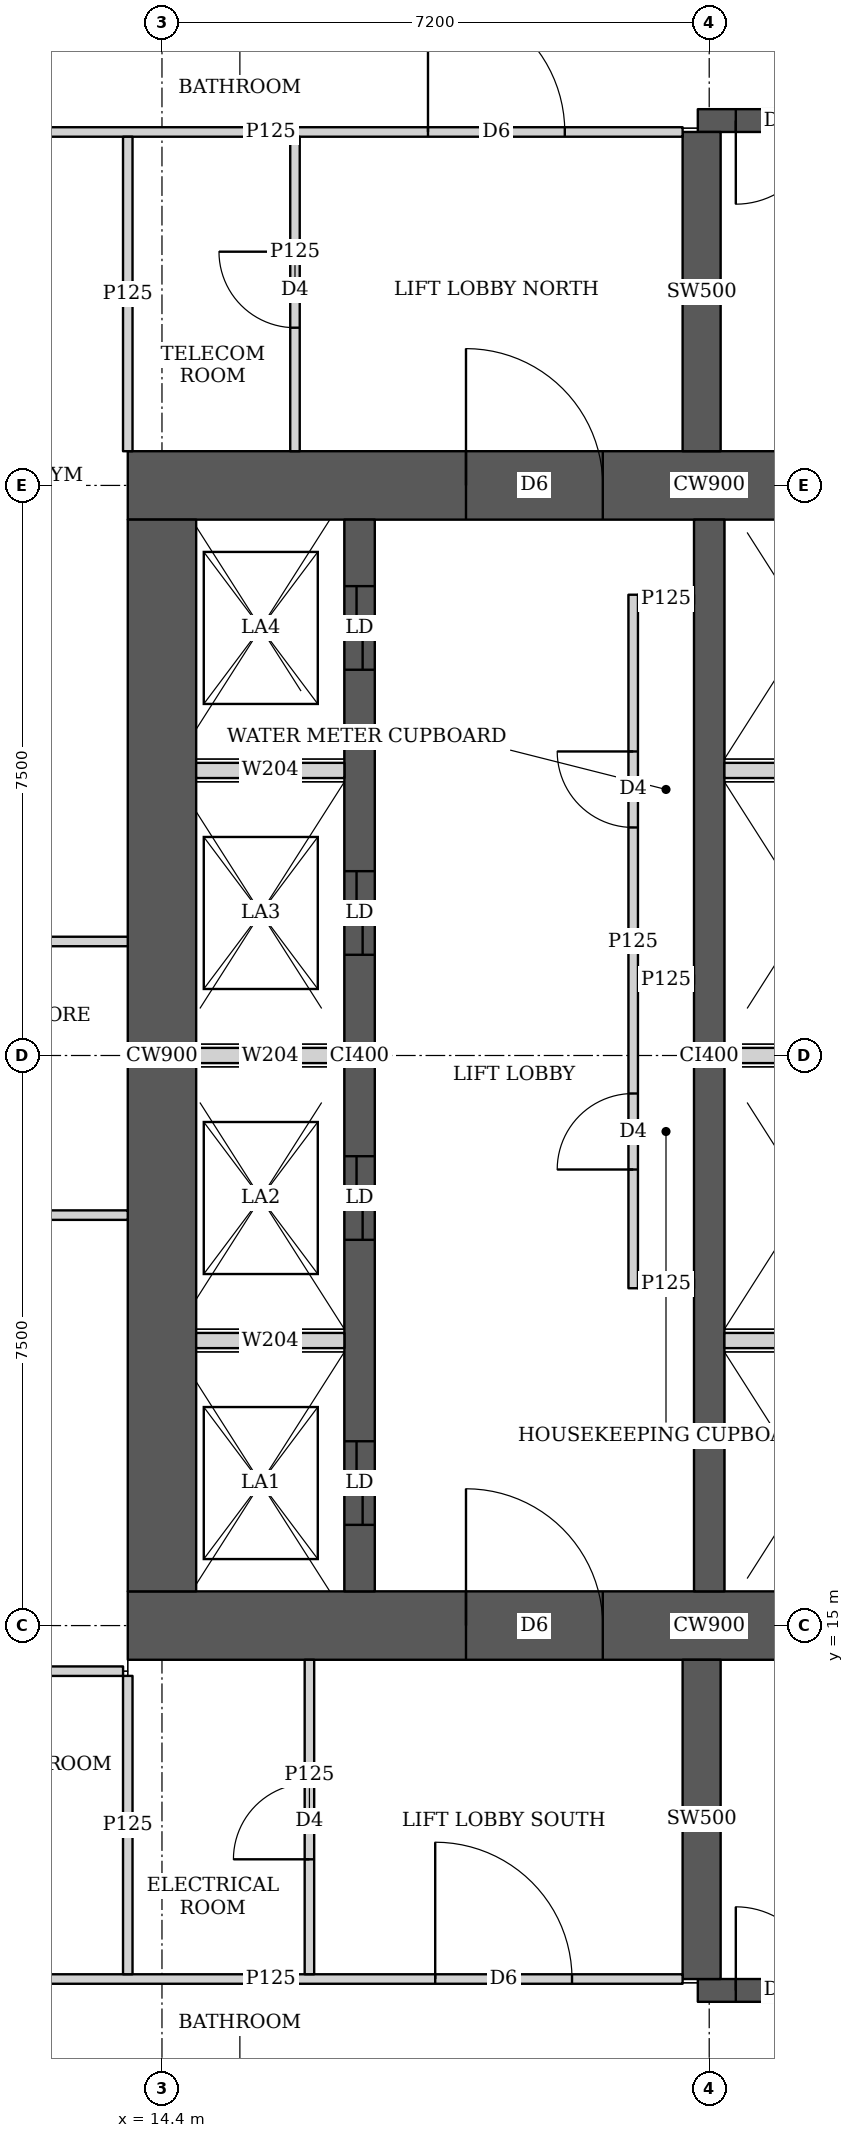
"""IFC4 building model, lengths in metres.
Left out: names, types, materials, properties, quantities, classifications, styles, units other than length and angle.
Written with IfcOpenShell. Run it as: python <this file> out.ifc"""

import sys

from ifc_helpers import new_model, si_unit, direction, frame, frame_2d, origin, place, context, subcontext, project, spatial, rectangle, extrude, element, fill, save


model = new_model("IFC4")
c1 = context("Model", 3, precision=1e-05, world=origin(), true_north=direction((0.0, 1.0)))
c2 = subcontext(c1, "Body", "Model", "MODEL_VIEW")
j1 = project(units=[si_unit("LENGTHUNIT", "METRE"), si_unit("PLANEANGLEUNIT", "RADIAN")], contexts=[c1])
p1 = place(None, origin())
s1 = spatial("IfcSite", under=j1, at=p1, CompositionType="ELEMENT")
p2 = place(p1, origin())
s2 = spatial("IfcBuilding", under=s1, at=p2, CompositionType="ELEMENT")
p3 = place(p2, frame((0.0, 0.0, 89.15)))
s3 = spatial("IfcBuildingStorey", under=s2, at=p3, CompositionType="ELEMENT", Elevation=89.15)
p4 = place(p3, frame((13.95, 15.0, 0.0), z_axis=(0.0, 0.0, 1.0), x_axis=(1.0, 0.0, 0.0)))
e1 = element("IfcWall", 1, at=p4, inside=s3, PredefinedType="SHEAR", context=c2, shape_type="SweptSolid", body=[
    extrude(rectangle(XDim=15.3, YDim=0.9, at=frame_2d((7.65, 0.0))), origin(), (0.0, 0.0, 1.0), 3.75),
])
p5 = place(p4, frame((4.45, 0.0, 0.0)))
e2 = element("IfcOpeningElement", 2, at=p5, cuts=e1, PredefinedType="OPENING", context=c2, shape_type="SweptSolid", body=[
    extrude(rectangle(XDim=1.8, YDim=2.1, at=frame_2d((0.9, 1.05))), frame((0.0, 0.46, 0.0), z_axis=(0.0, -1.0, 0.0), x_axis=(1.0, 0.0, 0.0)), (0.0, 0.0, 1.0), 0.92),
])
p6 = place(p4, frame((10.7, 0.0, 0.0)))
e3 = element("IfcOpeningElement", 3, at=p6, cuts=e1, PredefinedType="OPENING", context=c2, shape_type="SweptSolid", body=[
    extrude(rectangle(XDim=1.1, YDim=2.1, at=frame_2d((0.55, 1.05))), frame((0.0, 0.46, 0.0), z_axis=(0.0, -1.0, 0.0), x_axis=(1.0, 0.0, 0.0)), (0.0, 0.0, 1.0), 0.92),
])
p7 = place(p3, frame((13.95, 30.0, 0.0), z_axis=(0.0, 0.0, 1.0), x_axis=(1.0, 0.0, 0.0)))
e4 = element("IfcWall", 4, at=p7, inside=s3, PredefinedType="SHEAR", context=c2, shape_type="SweptSolid", body=[
    extrude(rectangle(XDim=15.3, YDim=0.9, at=frame_2d((7.65, 0.0))), origin(), (0.0, 0.0, 1.0), 3.75),
])
p8 = place(p7, frame((4.45, 0.0, 0.0)))
e5 = element("IfcOpeningElement", 5, at=p8, cuts=e4, PredefinedType="OPENING", context=c2, shape_type="SweptSolid", body=[
    extrude(rectangle(XDim=1.8, YDim=2.1, at=frame_2d((0.9, 1.05))), frame((0.0, 0.46, 0.0), z_axis=(0.0, -1.0, 0.0), x_axis=(1.0, 0.0, 0.0)), (0.0, 0.0, 1.0), 0.92),
])
p9 = place(p7, frame((10.7, 0.0, 0.0)))
e6 = element("IfcOpeningElement", 6, at=p9, cuts=e4, PredefinedType="OPENING", context=c2, shape_type="SweptSolid", body=[
    extrude(rectangle(XDim=1.1, YDim=2.1, at=frame_2d((0.55, 1.05))), frame((0.0, 0.46, 0.0), z_axis=(0.0, -1.0, 0.0), x_axis=(1.0, 0.0, 0.0)), (0.0, 0.0, 1.0), 0.92),
])
p10 = place(p3, frame((14.4, 15.45, 0.0), z_axis=(0.0, 0.0, 1.0), x_axis=(0.0, 1.0, 0.0)))
e7 = element("IfcWall", 7, at=p10, inside=s3, PredefinedType="SHEAR", context=c2, shape_type="SweptSolid", body=[
    extrude(rectangle(XDim=14.1, YDim=0.9, at=frame_2d((7.05, 0.0))), origin(), (0.0, 0.0, 1.0), 3.75),
])
p11 = place(p3, frame((17.0, 15.45, 0.0), z_axis=(0.0, 0.0, 1.0), x_axis=(0.0, 1.0, 0.0)))
e8 = element("IfcWall", 8, at=p11, inside=s3, PredefinedType="SHEAR", context=c2, shape_type="SweptSolid", body=[
    extrude(rectangle(XDim=14.1, YDim=0.4, at=frame_2d((7.05, 0.0))), origin(), (0.0, 0.0, 1.0), 3.75),
])
p12 = place(p11, frame((0.875, 0.0, 0.0)))
e9 = element("IfcOpeningElement", 9, at=p12, cuts=e8, PredefinedType="OPENING", context=c2, shape_type="SweptSolid", body=[
    extrude(rectangle(XDim=1.1, YDim=2.1, at=frame_2d((0.55, 1.05))), frame((0.0, 0.21, 0.0), z_axis=(0.0, -1.0, 0.0), x_axis=(1.0, 0.0, 0.0)), (0.0, 0.0, 1.0), 0.42),
])
p13 = place(p11, frame((4.625, 0.0, 0.0)))
e10 = element("IfcOpeningElement", 10, at=p13, cuts=e8, PredefinedType="OPENING", context=c2, shape_type="SweptSolid", body=[
    extrude(rectangle(XDim=1.1, YDim=2.1, at=frame_2d((0.55, 1.05))), frame((0.0, 0.21, 0.0), z_axis=(0.0, -1.0, 0.0), x_axis=(1.0, 0.0, 0.0)), (0.0, 0.0, 1.0), 0.42),
])
p14 = place(p11, frame((8.375, 0.0, 0.0)))
e11 = element("IfcOpeningElement", 11, at=p14, cuts=e8, PredefinedType="OPENING", context=c2, shape_type="SweptSolid", body=[
    extrude(rectangle(XDim=1.1, YDim=2.1, at=frame_2d((0.55, 1.05))), frame((0.0, 0.21, 0.0), z_axis=(0.0, -1.0, 0.0), x_axis=(1.0, 0.0, 0.0)), (0.0, 0.0, 1.0), 0.42),
])
p15 = place(p11, frame((12.125, 0.0, 0.0)))
e12 = element("IfcOpeningElement", 12, at=p15, cuts=e8, PredefinedType="OPENING", context=c2, shape_type="SweptSolid", body=[
    extrude(rectangle(XDim=1.1, YDim=2.1, at=frame_2d((0.55, 1.05))), frame((0.0, 0.21, 0.0), z_axis=(0.0, -1.0, 0.0), x_axis=(1.0, 0.0, 0.0)), (0.0, 0.0, 1.0), 0.42),
])
p16 = place(p3, frame((21.6, 15.45, 0.0), z_axis=(0.0, 0.0, 1.0), x_axis=(0.0, 1.0, 0.0)))
e13 = element("IfcWall", 13, at=p16, inside=s3, PredefinedType="SHEAR", context=c2, shape_type="SweptSolid", body=[
    extrude(rectangle(XDim=14.1, YDim=0.4, at=frame_2d((7.05, 0.0))), origin(), (0.0, 0.0, 1.0), 3.75),
])
p17 = place(p3, frame((21.45, 10.2, 0.0), z_axis=(0.0, 0.0, 1.0), x_axis=(1.0, 0.0, 0.0)))
e14 = element("IfcWall", 14, at=p17, inside=s3, PredefinedType="SHEAR", context=c2, shape_type="SweptSolid", body=[
    extrude(rectangle(XDim=7.5, YDim=0.3, at=frame_2d((3.75, 0.0))), origin(), (0.0, 0.0, 1.0), 3.75),
])
p18 = place(p17, frame((0.5, 0.0, 0.0)))
e15 = element("IfcOpeningElement", 15, at=p18, cuts=e14, PredefinedType="OPENING", context=c2, shape_type="SweptSolid", body=[
    extrude(rectangle(XDim=1.1, YDim=2.1, at=frame_2d((0.55, 1.05))), frame((0.0, 0.16, 0.0), z_axis=(0.0, -1.0, 0.0), x_axis=(1.0, 0.0, 0.0)), (0.0, 0.0, 1.0), 0.32),
])
p19 = place(p3, frame((21.5, 10.35, 0.0), z_axis=(0.0, 0.0, 1.0), x_axis=(0.0, 1.0, 0.0)))
e16 = element("IfcWall", 16, at=p19, inside=s3, PredefinedType="SHEAR", context=c2, shape_type="SweptSolid", body=[
    extrude(rectangle(XDim=4.2, YDim=0.5, at=frame_2d((2.1, 0.0))), origin(), (0.0, 0.0, 1.0), 3.75),
])
p20 = place(p3, frame((21.45, 34.8, 0.0), z_axis=(0.0, 0.0, 1.0), x_axis=(1.0, 0.0, 0.0)))
e17 = element("IfcWall", 17, at=p20, inside=s3, PredefinedType="SHEAR", context=c2, shape_type="SweptSolid", body=[
    extrude(rectangle(XDim=7.5, YDim=0.3, at=frame_2d((3.75, 0.0))), origin(), (0.0, 0.0, 1.0), 3.75),
])
p21 = place(p20, frame((0.5, 0.0, 0.0)))
e18 = element("IfcOpeningElement", 18, at=p21, cuts=e17, PredefinedType="OPENING", context=c2, shape_type="SweptSolid", body=[
    extrude(rectangle(XDim=1.1, YDim=2.1, at=frame_2d((0.55, 1.05))), frame((0.0, 0.16, 0.0), z_axis=(0.0, -1.0, 0.0), x_axis=(1.0, 0.0, 0.0)), (0.0, 0.0, 1.0), 0.32),
])
p22 = place(p3, frame((21.5, 30.45, 0.0), z_axis=(0.0, 0.0, 1.0), x_axis=(0.0, 1.0, 0.0)))
e19 = element("IfcWall", 19, at=p22, inside=s3, PredefinedType="SHEAR", context=c2, shape_type="SweptSolid", body=[
    extrude(rectangle(XDim=4.2, YDim=0.5, at=frame_2d((2.1, 0.0))), origin(), (0.0, 0.0, 1.0), 3.75),
])
p23 = place(p3, frame((10.413, 14.4, 0.0), z_axis=(0.0, 0.0, 1.0), x_axis=(1.0, 0.0, 0.0)))
e20 = element("IfcWall", 20, at=p23, inside=s3, PredefinedType="PARTITIONING", context=c2, shape_type="SweptSolid", body=[
    extrude(rectangle(XDim=3.475, YDim=0.125, at=frame_2d((1.737, 0.0))), origin(), (0.0, 0.0, 1.0), 3.5),
])
for number, where, z_axis, x_axis in (
    (21, (10.413, 20.4, 0.0), (0.0, 0.0, 1.0), (1.0, 0.0, 0.0)),
    (22, (10.413, 24.0, 0.0), (0.0, 0.0, 1.0), (1.0, 0.0, 0.0)),
):
    element("IfcWall", number, at=place(p3, frame(where, z_axis=z_axis, x_axis=x_axis)), inside=s3, PredefinedType="PARTITIONING", context=c2, shape_type="SweptSolid", body=[
        extrude(rectangle(XDim=3.537, YDim=0.125, at=frame_2d((1.769, 0.0))), origin(), (0.0, 0.0, 1.0), 3.5),
    ])
p24 = place(p3, frame((13.95, 10.413, 0.0), z_axis=(0.0, 0.0, 1.0), x_axis=(0.0, 1.0, 0.0)))
e23 = element("IfcWall", 23, at=p24, inside=s3, PredefinedType="PARTITIONING", context=c2, shape_type="SweptSolid", body=[
    extrude(rectangle(XDim=3.925, YDim=0.125, at=frame_2d((1.962, 0.0))), origin(), (0.0, 0.0, 1.0), 3.5),
])
p25 = place(p3, frame((13.95, 30.45, 0.0), z_axis=(0.0, 0.0, 1.0), x_axis=(0.0, 1.0, 0.0)))
e24 = element("IfcWall", 24, at=p25, inside=s3, PredefinedType="PARTITIONING", context=c2, shape_type="SweptSolid", body=[
    extrude(rectangle(XDim=4.137, YDim=0.125, at=frame_2d((2.068, 0.0))), origin(), (0.0, 0.0, 1.0), 3.5),
])
p26 = place(p3, frame((10.413, 10.35, 0.0), z_axis=(0.0, 0.0, 1.0), x_axis=(1.0, 0.0, 0.0)))
e25 = element("IfcWall", 25, at=p26, inside=s3, PredefinedType="PARTITIONING", context=c2, shape_type="SweptSolid", body=[
    extrude(rectangle(XDim=10.837, YDim=0.125, at=frame_2d((5.418, 0.0))), origin(), (0.0, 0.0, 1.0), 3.5),
])
p27 = place(p26, frame((7.582, 0.0, 0.0)))
e26 = element("IfcOpeningElement", 26, at=p27, cuts=e25, PredefinedType="OPENING", context=c2, shape_type="SweptSolid", body=[
    extrude(rectangle(XDim=1.8, YDim=2.1, at=frame_2d((0.9, 1.05))), frame((0.0, 0.073, 0.0), z_axis=(0.0, -1.0, 0.0), x_axis=(1.0, 0.0, 0.0)), (0.0, 0.0, 1.0), 0.145),
])
p28 = place(p3, frame((10.413, 34.65, 0.0), z_axis=(0.0, 0.0, 1.0), x_axis=(1.0, 0.0, 0.0)))
e27 = element("IfcWall", 27, at=p28, inside=s3, PredefinedType="PARTITIONING", context=c2, shape_type="SweptSolid", body=[
    extrude(rectangle(XDim=10.837, YDim=0.125, at=frame_2d((5.418, 0.0))), origin(), (0.0, 0.0, 1.0), 3.5),
])
p29 = place(p28, frame((7.487, 0.0, 0.0)))
e28 = element("IfcOpeningElement", 28, at=p29, cuts=e27, PredefinedType="OPENING", context=c2, shape_type="SweptSolid", body=[
    extrude(rectangle(XDim=1.8, YDim=2.1, at=frame_2d((0.9, 1.05))), frame((0.0, 0.073, 0.0), z_axis=(0.0, -1.0, 0.0), x_axis=(1.0, 0.0, 0.0)), (0.0, 0.0, 1.0), 0.145),
])
p30 = place(p3, frame((16.34, 10.413, 0.0), z_axis=(0.0, 0.0, 1.0), x_axis=(0.0, 1.0, 0.0)))
e29 = element("IfcWall", 29, at=p30, inside=s3, PredefinedType="PARTITIONING", context=c2, shape_type="SweptSolid", body=[
    extrude(rectangle(XDim=4.137, YDim=0.125, at=frame_2d((2.068, 0.0))), origin(), (0.0, 0.0, 1.0), 3.5),
])
p31 = place(p30, frame((1.512, 0.0, 0.0)))
e30 = element("IfcOpeningElement", 30, at=p31, cuts=e29, PredefinedType="OPENING", context=c2, shape_type="SweptSolid", body=[
    extrude(rectangle(XDim=1.0, YDim=2.1, at=frame_2d((0.5, 1.05))), frame((0.0, 0.073, 0.0), z_axis=(0.0, -1.0, 0.0), x_axis=(1.0, 0.0, 0.0)), (0.0, 0.0, 1.0), 0.145),
])
p32 = place(p3, frame((16.15, 30.45, 0.0), z_axis=(0.0, 0.0, 1.0), x_axis=(0.0, 1.0, 0.0)))
e31 = element("IfcWall", 31, at=p32, inside=s3, PredefinedType="PARTITIONING", context=c2, shape_type="SweptSolid", body=[
    extrude(rectangle(XDim=4.137, YDim=0.125, at=frame_2d((2.068, 0.0))), origin(), (0.0, 0.0, 1.0), 3.5),
])
p33 = place(p32, frame((1.625, 0.0, 0.0)))
e32 = element("IfcOpeningElement", 32, at=p33, cuts=e31, PredefinedType="OPENING", context=c2, shape_type="SweptSolid", body=[
    extrude(rectangle(XDim=1.0, YDim=2.1, at=frame_2d((0.5, 1.05))), frame((0.0, 0.073, 0.0), z_axis=(0.0, -1.0, 0.0), x_axis=(1.0, 0.0, 0.0)), (0.0, 0.0, 1.0), 0.145),
])
p34 = place(p3, frame((20.6, 19.438, 0.0), z_axis=(0.0, 0.0, 1.0), x_axis=(0.0, 1.0, 0.0)))
e33 = element("IfcWall", 33, at=p34, inside=s3, PredefinedType="PARTITIONING", context=c2, shape_type="SweptSolid", body=[
    extrude(rectangle(XDim=9.124, YDim=0.125, at=frame_2d((4.562, 0.0))), origin(), (0.0, 0.0, 1.0), 3.5),
])
p35 = place(p34, frame((1.562, 0.0, 0.0)))
e34 = element("IfcOpeningElement", 34, at=p35, cuts=e33, PredefinedType="OPENING", context=c2, shape_type="SweptSolid", body=[
    extrude(rectangle(XDim=1.0, YDim=2.1, at=frame_2d((0.5, 1.05))), frame((0.0, 0.073, 0.0), z_axis=(0.0, -1.0, 0.0), x_axis=(1.0, 0.0, 0.0)), (0.0, 0.0, 1.0), 0.145),
])
p36 = place(p34, frame((6.062, 0.0, 0.0)))
e35 = element("IfcOpeningElement", 35, at=p36, cuts=e33, PredefinedType="OPENING", context=c2, shape_type="SweptSolid", body=[
    extrude(rectangle(XDim=1.0, YDim=2.1, at=frame_2d((0.5, 1.05))), frame((0.0, 0.073, 0.0), z_axis=(0.0, -1.0, 0.0), x_axis=(1.0, 0.0, 0.0)), (0.0, 0.0, 1.0), 0.145),
])
for number, where, z_axis, x_axis in (
    (36, (20.663, 19.5, 0.0), (0.0, 0.0, 1.0), (1.0, 0.0, 0.0)),
    (37, (20.663, 28.5, 0.0), (0.0, 0.0, 1.0), (1.0, 0.0, 0.0)),
    (38, (20.663, 23.5, 0.0), (0.0, 0.0, 1.0), (1.0, 0.0, 0.0)),
):
    element("IfcWall", number, at=place(p3, frame(where, z_axis=z_axis, x_axis=x_axis)), inside=s3, PredefinedType="PARTITIONING", context=c2, shape_type="SweptSolid", body=[
        extrude(rectangle(XDim=0.737, YDim=0.125, at=frame_2d((0.368, 0.0))), origin(), (0.0, 0.0, 1.0), 3.5),
    ])
p37 = place(p3, frame((14.85, 18.75, 0.0), z_axis=(0.0, 0.0, 1.0), x_axis=(1.0, 0.0, 0.0)))
e39 = element("IfcWall", 39, at=p37, inside=s3, PredefinedType="SOLIDWALL", context=c2, shape_type="SweptSolid", body=[
    extrude(rectangle(XDim=1.95, YDim=0.2, at=frame_2d((0.975, 0.0))), origin(), (0.0, 0.0, 1.0), 3.5),
])
p38 = place(p3, frame((21.8, 18.75, 0.0), z_axis=(0.0, 0.0, 1.0), x_axis=(1.0, 0.0, 0.0)))
e40 = element("IfcWall", 40, at=p38, inside=s3, PredefinedType="SOLIDWALL", context=c2, shape_type="SweptSolid", body=[
    extrude(rectangle(XDim=2.2, YDim=0.2, at=frame_2d((1.1, 0.0))), origin(), (0.0, 0.0, 1.0), 3.5),
])
p39 = place(p3, frame((14.85, 22.5, 0.0), z_axis=(0.0, 0.0, 1.0), x_axis=(1.0, 0.0, 0.0)))
e41 = element("IfcWall", 41, at=p39, inside=s3, PredefinedType="SOLIDWALL", context=c2, shape_type="SweptSolid", body=[
    extrude(rectangle(XDim=1.95, YDim=0.2, at=frame_2d((0.975, 0.0))), origin(), (0.0, 0.0, 1.0), 3.5),
])
p40 = place(p3, frame((21.8, 22.5, 0.0), z_axis=(0.0, 0.0, 1.0), x_axis=(1.0, 0.0, 0.0)))
e42 = element("IfcWall", 42, at=p40, inside=s3, PredefinedType="SOLIDWALL", context=c2, shape_type="SweptSolid", body=[
    extrude(rectangle(XDim=2.2, YDim=0.2, at=frame_2d((1.1, 0.0))), origin(), (0.0, 0.0, 1.0), 3.5),
])
p41 = place(p3, frame((14.85, 26.25, 0.0), z_axis=(0.0, 0.0, 1.0), x_axis=(1.0, 0.0, 0.0)))
e43 = element("IfcWall", 43, at=p41, inside=s3, PredefinedType="SOLIDWALL", context=c2, shape_type="SweptSolid", body=[
    extrude(rectangle(XDim=1.95, YDim=0.2, at=frame_2d((0.975, 0.0))), origin(), (0.0, 0.0, 1.0), 3.5),
])
p42 = place(p3, frame((21.8, 26.25, 0.0), z_axis=(0.0, 0.0, 1.0), x_axis=(1.0, 0.0, 0.0)))
e44 = element("IfcWall", 44, at=p42, inside=s3, PredefinedType="SOLIDWALL", context=c2, shape_type="SweptSolid", body=[
    extrude(rectangle(XDim=2.2, YDim=0.2, at=frame_2d((1.1, 0.0))), origin(), (0.0, 0.0, 1.0), 3.5),
])
p43 = place(p31, origin())
e45 = element("IfcDoor", 45, at=p43, inside=s3, OperationType="SINGLE_SWING_LEFT", PredefinedType="DOOR", context=c2, shape_type="SweptSolid", body=[
    extrude(rectangle(XDim=1.0, YDim=2.1, at=frame_2d((0.5, 1.05))), frame((0.0, 0.025, 0.0), z_axis=(0.0, -1.0, 0.0), x_axis=(1.0, 0.0, 0.0)), (0.0, 0.0, 1.0), 0.05),
])
fill(e30, e45)
p44 = place(p27, origin())
e46 = element("IfcDoor", 46, at=p44, inside=s3, OperationType="DOUBLE_DOOR_SINGLE_SWING", PredefinedType="DOOR", context=c2, shape_type="SweptSolid", body=[
    extrude(rectangle(XDim=1.8, YDim=2.1, at=frame_2d((0.9, 1.05))), frame((0.0, 0.025, 0.0), z_axis=(0.0, -1.0, 0.0), x_axis=(1.0, 0.0, 0.0)), (0.0, 0.0, 1.0), 0.05),
])
fill(e26, e46)
p45 = place(p33, origin())
e47 = element("IfcDoor", 47, at=p45, inside=s3, OperationType="SINGLE_SWING_RIGHT", PredefinedType="DOOR", context=c2, shape_type="SweptSolid", body=[
    extrude(rectangle(XDim=1.0, YDim=2.1, at=frame_2d((0.5, 1.05))), frame((0.0, 0.025, 0.0), z_axis=(0.0, -1.0, 0.0), x_axis=(1.0, 0.0, 0.0)), (0.0, 0.0, 1.0), 0.05),
])
fill(e32, e47)
p46 = place(p29, origin())
e48 = element("IfcDoor", 48, at=p46, inside=s3, OperationType="DOUBLE_DOOR_SINGLE_SWING", PredefinedType="DOOR", context=c2, shape_type="SweptSolid", body=[
    extrude(rectangle(XDim=1.8, YDim=2.1, at=frame_2d((0.9, 1.05))), frame((0.0, 0.025, 0.0), z_axis=(0.0, -1.0, 0.0), x_axis=(1.0, 0.0, 0.0)), (0.0, 0.0, 1.0), 0.05),
])
fill(e28, e48)
p47 = place(p35, origin())
e49 = element("IfcDoor", 49, at=p47, inside=s3, OperationType="SINGLE_SWING_LEFT", PredefinedType="DOOR", context=c2, shape_type="SweptSolid", body=[
    extrude(rectangle(XDim=1.0, YDim=2.1, at=frame_2d((0.5, 1.05))), frame((0.0, 0.025, 0.0), z_axis=(0.0, -1.0, 0.0), x_axis=(1.0, 0.0, 0.0)), (0.0, 0.0, 1.0), 0.05),
])
fill(e34, e49)
p48 = place(p36, origin())
e50 = element("IfcDoor", 50, at=p48, inside=s3, OperationType="SINGLE_SWING_RIGHT", PredefinedType="DOOR", context=c2, shape_type="SweptSolid", body=[
    extrude(rectangle(XDim=1.0, YDim=2.1, at=frame_2d((0.5, 1.05))), frame((0.0, 0.025, 0.0), z_axis=(0.0, -1.0, 0.0), x_axis=(1.0, 0.0, 0.0)), (0.0, 0.0, 1.0), 0.05),
])
fill(e35, e50)
p49 = place(p5, origin())
e51 = element("IfcDoor", 51, at=p49, inside=s3, OperationType="DOUBLE_DOOR_SINGLE_SWING", PredefinedType="DOOR", context=c2, shape_type="SweptSolid", body=[
    extrude(rectangle(XDim=1.8, YDim=2.1, at=frame_2d((0.9, 1.05))), frame((0.0, 0.025, 0.0), z_axis=(0.0, -1.0, 0.0), x_axis=(1.0, 0.0, 0.0)), (0.0, 0.0, 1.0), 0.05),
])
fill(e2, e51)
p50 = place(p8, origin())
e52 = element("IfcDoor", 52, at=p50, inside=s3, OperationType="DOUBLE_DOOR_SINGLE_SWING", PredefinedType="DOOR", context=c2, shape_type="SweptSolid", body=[
    extrude(rectangle(XDim=1.8, YDim=2.1, at=frame_2d((0.9, 1.05))), frame((0.0, 0.025, 0.0), z_axis=(0.0, -1.0, 0.0), x_axis=(1.0, 0.0, 0.0)), (0.0, 0.0, 1.0), 0.05),
])
fill(e5, e52)
p51 = place(p12, origin())
e53 = element("IfcDoor", 53, at=p51, inside=s3, OperationType="DOUBLE_DOOR_SLIDING", PredefinedType="DOOR", context=c2, shape_type="SweptSolid", body=[
    extrude(rectangle(XDim=1.1, YDim=2.1, at=frame_2d((0.55, 1.05))), frame((0.0, 0.025, 0.0), z_axis=(0.0, -1.0, 0.0), x_axis=(1.0, 0.0, 0.0)), (0.0, 0.0, 1.0), 0.05),
])
fill(e9, e53)
p52 = place(p13, origin())
e54 = element("IfcDoor", 54, at=p52, inside=s3, OperationType="DOUBLE_DOOR_SLIDING", PredefinedType="DOOR", context=c2, shape_type="SweptSolid", body=[
    extrude(rectangle(XDim=1.1, YDim=2.1, at=frame_2d((0.55, 1.05))), frame((0.0, 0.025, 0.0), z_axis=(0.0, -1.0, 0.0), x_axis=(1.0, 0.0, 0.0)), (0.0, 0.0, 1.0), 0.05),
])
fill(e10, e54)
p53 = place(p14, origin())
e55 = element("IfcDoor", 55, at=p53, inside=s3, OperationType="DOUBLE_DOOR_SLIDING", PredefinedType="DOOR", context=c2, shape_type="SweptSolid", body=[
    extrude(rectangle(XDim=1.1, YDim=2.1, at=frame_2d((0.55, 1.05))), frame((0.0, 0.025, 0.0), z_axis=(0.0, -1.0, 0.0), x_axis=(1.0, 0.0, 0.0)), (0.0, 0.0, 1.0), 0.05),
])
fill(e11, e55)
p54 = place(p15, origin())
e56 = element("IfcDoor", 56, at=p54, inside=s3, OperationType="DOUBLE_DOOR_SLIDING", PredefinedType="DOOR", context=c2, shape_type="SweptSolid", body=[
    extrude(rectangle(XDim=1.1, YDim=2.1, at=frame_2d((0.55, 1.05))), frame((0.0, 0.025, 0.0), z_axis=(0.0, -1.0, 0.0), x_axis=(1.0, 0.0, 0.0)), (0.0, 0.0, 1.0), 0.05),
])
fill(e12, e56)
p55 = place(p18, origin())
e57 = element("IfcDoor", 57, at=p55, inside=s3, OperationType="SINGLE_SWING_LEFT", PredefinedType="DOOR", context=c2, shape_type="SweptSolid", body=[
    extrude(rectangle(XDim=1.1, YDim=2.1, at=frame_2d((0.55, 1.05))), frame((0.0, 0.025, 0.0), z_axis=(0.0, -1.0, 0.0), x_axis=(1.0, 0.0, 0.0)), (0.0, 0.0, 1.0), 0.05),
])
fill(e15, e57)
p56 = place(p21, origin())
e58 = element("IfcDoor", 58, at=p56, inside=s3, OperationType="SINGLE_SWING_RIGHT", PredefinedType="DOOR", context=c2, shape_type="SweptSolid", body=[
    extrude(rectangle(XDim=1.1, YDim=2.1, at=frame_2d((0.55, 1.05))), frame((0.0, 0.025, 0.0), z_axis=(0.0, -1.0, 0.0), x_axis=(1.0, 0.0, 0.0)), (0.0, 0.0, 1.0), 0.05),
])
fill(e18, e58)
save(model, sys.argv[1])
